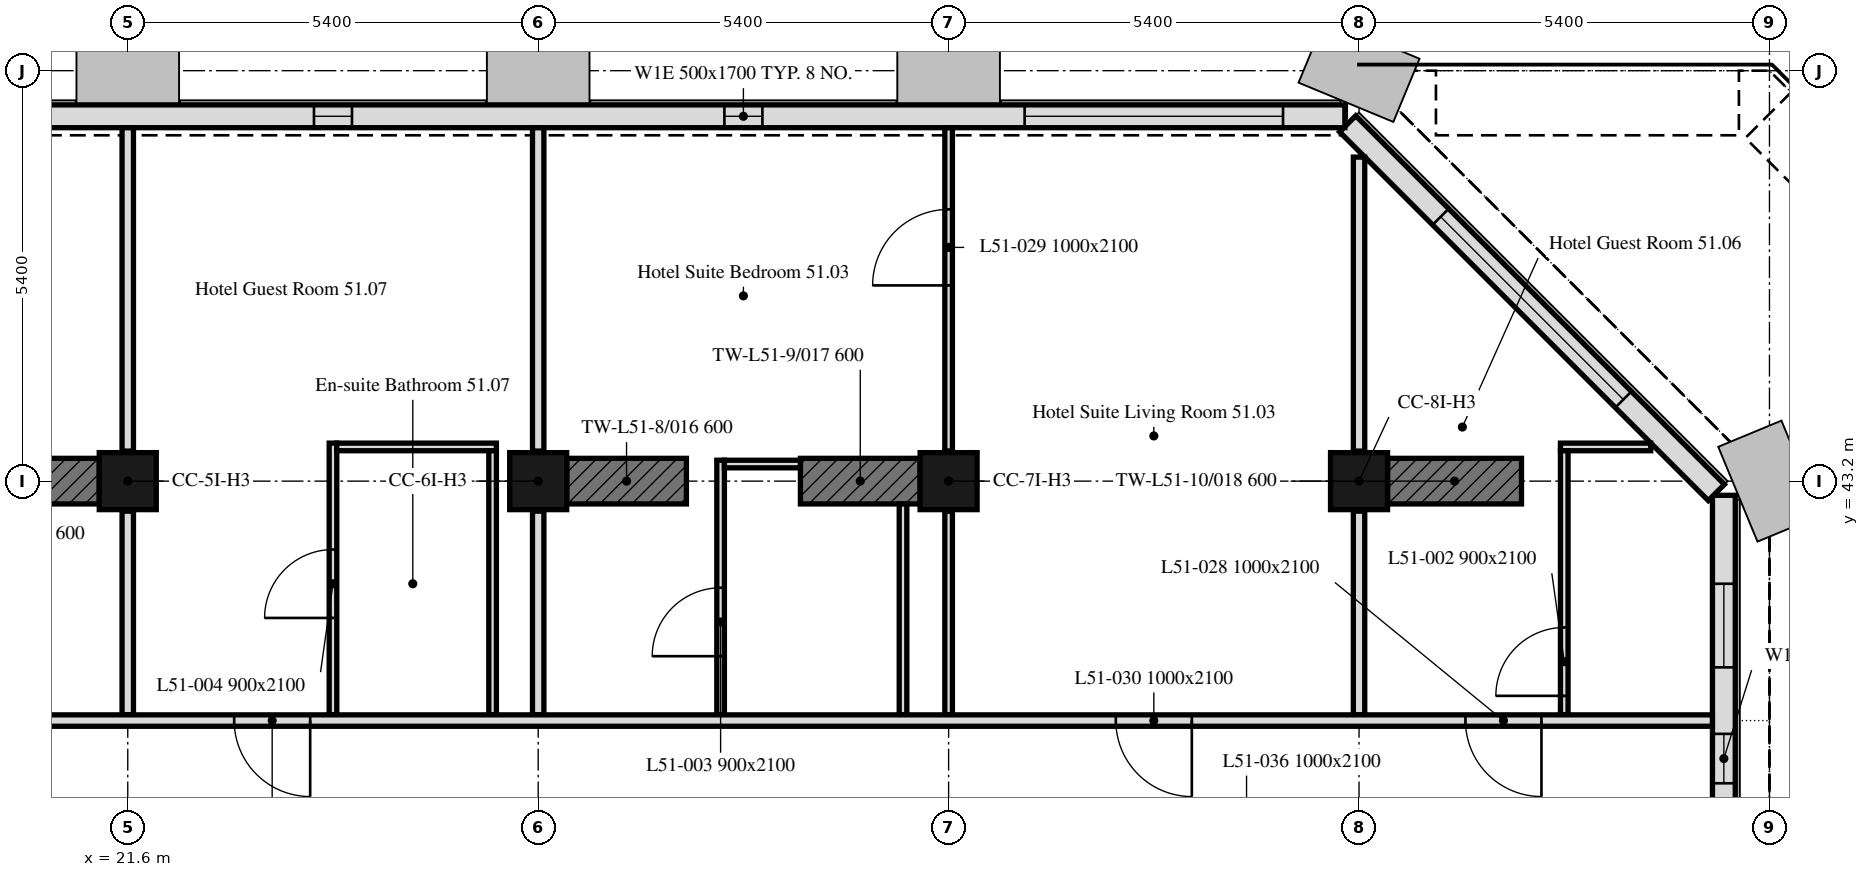
"""IFC4 building model, lengths in metres.
Left out: names, types, materials, properties, quantities, classifications, styles, units other than length and angle.
Written with IfcOpenShell. Run it as: python <this file> out.ifc"""

import sys

from ifc_helpers import new_model, si_unit, direction, frame, frame_2d, origin, origin_2d, place, context, subcontext, project, spatial, rectangle, extrude, element, fill, save


model = new_model("IFC4")
c1 = context("Model", 3, precision=1e-05, world=origin(), true_north=direction((0.0, 1.0)))
c2 = subcontext(c1, "Body", "Model", "MODEL_VIEW")
j1 = project(units=[si_unit("LENGTHUNIT", "METRE"), si_unit("PLANEANGLEUNIT", "RADIAN")], contexts=[c1])
p1 = place(None, origin())
s1 = spatial("IfcSite", under=j1, at=p1, CompositionType="ELEMENT")
p2 = place(p1, origin())
s2 = spatial("IfcBuilding", under=s1, at=p2, CompositionType="ELEMENT")
p3 = place(p2, frame((0.0, 0.0, 207.1)))
s3 = spatial("IfcBuildingStorey", under=s2, at=p3, CompositionType="ELEMENT", Elevation=207.1)
for number, where, z_axis, x_axis in (
    (1, (21.6, 43.2, 0.0), (0.0, 0.0, 1.0), (1.0, 0.0, 0.0)),
    (2, (27.0, 43.2, 0.0), (0.0, 0.0, 1.0), (1.0, 0.0, 0.0)),
    (3, (32.4, 43.2, 0.0), (0.0, 0.0, 1.0), (1.0, 0.0, 0.0)),
    (4, (37.8, 43.2, 0.0), (0.0, 0.0, 1.0), (1.0, 0.0, 0.0)),
):
    element("IfcColumn", number, at=place(p3, frame(where, z_axis=z_axis, x_axis=x_axis)), inside=s3, PredefinedType="COLUMN", context=c2, shape_type="SweptSolid", body=[
        extrude(rectangle(XDim=0.75, YDim=0.75, at=origin_2d()), origin(), (0.0, 0.0, 1.0), 3.0),
    ])
p4 = place(p3, frame((19.65, 43.2, 0.0), z_axis=(0.0, 0.0, 1.0), x_axis=(1.0, 0.0, 0.0)))
e5 = element("IfcWall", 5, at=p4, inside=s3, PredefinedType="SHEAR", context=c2, shape_type="SweptSolid", body=[
    extrude(rectangle(XDim=1.575, YDim=0.6, at=frame_2d((0.788, 0.0))), origin(), (0.0, 0.0, 1.0), 3.0),
])
for number, where, z_axis, x_axis in (
    (6, (27.375, 43.2, 0.0), (0.0, 0.0, 1.0), (1.0, 0.0, 0.0)),
    (7, (30.45, 43.2, 0.0), (0.0, 0.0, 1.0), (1.0, 0.0, 0.0)),
):
    element("IfcWall", number, at=place(p3, frame(where, z_axis=z_axis, x_axis=x_axis)), inside=s3, PredefinedType="SHEAR", context=c2, shape_type="SweptSolid", body=[
        extrude(rectangle(XDim=1.575, YDim=0.6, at=frame_2d((0.788, 0.0))), origin(), (0.0, 0.0, 1.0), 3.0),
    ])
p5 = place(p3, frame((38.175, 43.2, 0.0), z_axis=(0.0, 0.0, 1.0), x_axis=(1.0, 0.0, 0.0)))
e8 = element("IfcWall", 8, at=p5, inside=s3, PredefinedType="SHEAR", context=c2, shape_type="SweptSolid", body=[
    extrude(rectangle(XDim=1.762, YDim=0.6, at=frame_2d((0.881, 0.0))), origin(), (0.0, 0.0, 1.0), 3.0),
])
p6 = place(p3, frame((42.6, 32.4, 0.0), z_axis=(0.0, 0.0, 1.0), x_axis=(0.0, 1.0, 0.0)))
e9 = element("IfcWall", 9, at=p6, inside=s3, PredefinedType="SOLIDWALL", context=c2, shape_type="SweptSolid", body=[
    extrude(rectangle(XDim=10.614, YDim=0.3, at=frame_2d((5.307, 0.0))), origin(), (0.0, 0.0, 1.0), 3.0),
])
p7 = place(p6, frame((1.0, 0.0, 0.9)))
e10 = element("IfcOpeningElement", 10, at=p7, cuts=e9, PredefinedType="OPENING", context=c2, shape_type="SweptSolid", body=[
    extrude(rectangle(XDim=3.4, YDim=1.7, at=frame_2d((1.7, 0.85))), frame((0.0, 0.16, 0.0), z_axis=(0.0, -1.0, 0.0), x_axis=(1.0, 0.0, 0.0)), (0.0, 0.0, 1.0), 0.32),
])
p8 = place(p6, frame((6.825, 0.0, 0.9)))
e11 = element("IfcOpeningElement", 11, at=p8, cuts=e9, PredefinedType="OPENING", context=c2, shape_type="SweptSolid", body=[
    extrude(rectangle(XDim=0.65, YDim=1.7, at=frame_2d((0.325, 0.85))), frame((0.0, 0.16, 0.0), z_axis=(0.0, -1.0, 0.0), x_axis=(1.0, 0.0, 0.0)), (0.0, 0.0, 1.0), 0.32),
])
p9 = place(p6, frame((8.35, 0.0, 0.9)))
e12 = element("IfcOpeningElement", 12, at=p9, cuts=e9, PredefinedType="OPENING", context=c2, shape_type="SweptSolid", body=[
    extrude(rectangle(XDim=1.1, YDim=1.7, at=frame_2d((0.55, 0.85))), frame((0.0, 0.16, 0.0), z_axis=(0.0, -1.0, 0.0), x_axis=(1.0, 0.0, 0.0)), (0.0, 0.0, 1.0), 0.32),
])
p10 = place(p3, frame((42.501, 43.051, 0.0), z_axis=(0.0, 0.0, 1.0), x_axis=(-0.707106781187, 0.707106781187, 0.0)))
e13 = element("IfcWall", 13, at=p10, inside=s3, PredefinedType="SOLIDWALL", context=c2, shape_type="SweptSolid", body=[
    extrude(rectangle(XDim=6.86, YDim=0.3, at=frame_2d((3.43, 0.0))), origin(), (0.0, 0.0, 1.0), 3.0),
])
p11 = place(p10, frame((1.73, 0.0, 0.9)))
e14 = element("IfcOpeningElement", 14, at=p11, cuts=e13, PredefinedType="OPENING", context=c2, shape_type="SweptSolid", body=[
    extrude(rectangle(XDim=3.4, YDim=1.7, at=frame_2d((1.7, 0.85))), frame((0.0, 0.16, 0.0), z_axis=(0.0, -1.0, 0.0), x_axis=(1.0, 0.0, 0.0)), (0.0, 0.0, 1.0), 0.32),
])
p12 = place(p3, frame((37.614, 48.0, 0.0), z_axis=(0.0, 0.0, 1.0), x_axis=(-1.0, 0.0, 0.0)))
e15 = element("IfcWall", 15, at=p12, inside=s3, PredefinedType="SOLIDWALL", context=c2, shape_type="SweptSolid", body=[
    extrude(rectangle(XDim=32.027, YDim=0.3, at=frame_2d((16.014, 0.0))), origin(), (0.0, 0.0, 1.0), 3.0),
])
p13 = place(p12, frame((0.814, 0.0, 0.9)))
e16 = element("IfcOpeningElement", 16, at=p13, cuts=e15, PredefinedType="OPENING", context=c2, shape_type="SweptSolid", body=[
    extrude(rectangle(XDim=3.4, YDim=1.7, at=frame_2d((1.7, 0.85))), frame((0.0, 0.16, 0.0), z_axis=(0.0, -1.0, 0.0), x_axis=(1.0, 0.0, 0.0)), (0.0, 0.0, 1.0), 0.32),
])
p14 = place(p12, frame((7.664, 0.0, 0.9)))
e17 = element("IfcOpeningElement", 17, at=p14, cuts=e15, PredefinedType="OPENING", context=c2, shape_type="SweptSolid", body=[
    extrude(rectangle(XDim=0.5, YDim=1.7, at=frame_2d((0.25, 0.85))), frame((0.0, 0.16, 0.0), z_axis=(0.0, -1.0, 0.0), x_axis=(1.0, 0.0, 0.0)), (0.0, 0.0, 1.0), 0.32),
])
p15 = place(p12, frame((13.064, 0.0, 0.9)))
e18 = element("IfcOpeningElement", 18, at=p15, cuts=e15, PredefinedType="OPENING", context=c2, shape_type="SweptSolid", body=[
    extrude(rectangle(XDim=0.5, YDim=1.7, at=frame_2d((0.25, 0.85))), frame((0.0, 0.16, 0.0), z_axis=(0.0, -1.0, 0.0), x_axis=(1.0, 0.0, 0.0)), (0.0, 0.0, 1.0), 0.32),
])
p16 = place(p12, frame((18.464, 0.0, 0.9)))
e19 = element("IfcOpeningElement", 19, at=p16, cuts=e15, PredefinedType="OPENING", context=c2, shape_type="SweptSolid", body=[
    extrude(rectangle(XDim=0.5, YDim=1.7, at=frame_2d((0.25, 0.85))), frame((0.0, 0.16, 0.0), z_axis=(0.0, -1.0, 0.0), x_axis=(1.0, 0.0, 0.0)), (0.0, 0.0, 1.0), 0.32),
])
p17 = place(p12, frame((23.864, 0.0, 0.9)))
e20 = element("IfcOpeningElement", 20, at=p17, cuts=e15, PredefinedType="OPENING", context=c2, shape_type="SweptSolid", body=[
    extrude(rectangle(XDim=0.5, YDim=1.7, at=frame_2d((0.25, 0.85))), frame((0.0, 0.16, 0.0), z_axis=(0.0, -1.0, 0.0), x_axis=(1.0, 0.0, 0.0)), (0.0, 0.0, 1.0), 0.32),
])
p18 = place(p12, frame((28.164, 0.0, 0.9)))
e21 = element("IfcOpeningElement", 21, at=p18, cuts=e15, PredefinedType="OPENING", context=c2, shape_type="SweptSolid", body=[
    extrude(rectangle(XDim=1.1, YDim=1.7, at=frame_2d((0.55, 0.85))), frame((0.0, 0.16, 0.0), z_axis=(0.0, -1.0, 0.0), x_axis=(1.0, 0.0, 0.0)), (0.0, 0.0, 1.0), 0.32),
])
p19 = place(p3, frame((40.45, 43.65, 0.0), z_axis=(0.0, 0.0, 1.0), x_axis=(1.0, 0.0, 0.0)))
e22 = element("IfcWall", 22, at=p19, inside=s3, PredefinedType="PARTITIONING", context=c2, shape_type="SweptSolid", body=[
    extrude(rectangle(XDim=1.188, YDim=0.1, at=frame_2d((0.594, 0.0))), origin(), (0.0, 0.0, 1.0), 3.0),
])
p20 = place(p3, frame((37.8, 47.463, 0.0), z_axis=(0.0, 0.0, 1.0), x_axis=(0.0, -1.0, 0.0)))
e23 = element("IfcWall", 23, at=p20, inside=s3, PredefinedType="PARTITIONING", context=c2, shape_type="SweptSolid", body=[
    extrude(rectangle(XDim=3.868, YDim=0.15, at=frame_2d((1.934, 0.0))), origin(), (0.0, 0.0, 1.0), 3.0),
])
p21 = place(p3, frame((37.8, 42.805, 0.0), z_axis=(0.0, 0.0, 1.0), x_axis=(0.0, -1.0, 0.0)))
e24 = element("IfcWall", 24, at=p21, inside=s3, PredefinedType="PARTITIONING", context=c2, shape_type="SweptSolid", body=[
    extrude(rectangle(XDim=2.68, YDim=0.15, at=frame_2d((1.34, 0.0))), origin(), (0.0, 0.0, 1.0), 3.0),
])
p22 = place(p3, frame((40.5, 40.125, 0.0), z_axis=(0.0, 0.0, 1.0), x_axis=(0.0, 1.0, 0.0)))
e25 = element("IfcWall", 25, at=p22, inside=s3, PredefinedType="PARTITIONING", context=c2, shape_type="SweptSolid", body=[
    extrude(rectangle(XDim=3.475, YDim=0.1, at=frame_2d((1.738, 0.0))), origin(), (0.0, 0.0, 1.0), 3.0),
])
p23 = place(p22, frame((0.25, 0.0, 0.0)))
e26 = element("IfcOpeningElement", 26, at=p23, cuts=e25, PredefinedType="OPENING", context=c2, shape_type="SweptSolid", body=[
    extrude(rectangle(XDim=0.9, YDim=2.1, at=frame_2d((0.45, 1.05))), frame((0.0, 0.05, 0.0), z_axis=(0.0, -1.0, 0.0), x_axis=(1.0, 0.0, 0.0)), (0.0, 0.0, 1.0), 0.1),
])
p24 = place(p3, frame((32.4, 40.125, 0.0), z_axis=(0.0, 0.0, 1.0), x_axis=(0.0, 1.0, 0.0)))
e27 = element("IfcWall", 27, at=p24, inside=s3, PredefinedType="PARTITIONING", context=c2, shape_type="SweptSolid", body=[
    extrude(rectangle(XDim=2.68, YDim=0.1, at=frame_2d((1.34, 0.0))), origin(), (0.0, 0.0, 1.0), 2.4),
])
p25 = place(p3, frame((32.4, 43.595, 0.0), z_axis=(0.0, 0.0, 1.0), x_axis=(0.0, 1.0, 0.0)))
e28 = element("IfcWall", 28, at=p25, inside=s3, PredefinedType="PARTITIONING", context=c2, shape_type="SweptSolid", body=[
    extrude(rectangle(XDim=4.254, YDim=0.1, at=frame_2d((2.127, 0.0))), origin(), (0.0, 0.0, 1.0), 2.4),
])
p26 = place(p25, frame((2.18, 0.0, 0.0)))
e29 = element("IfcOpeningElement", 29, at=p26, cuts=e28, PredefinedType="OPENING", context=c2, shape_type="SweptSolid", body=[
    extrude(rectangle(XDim=1.0, YDim=2.1, at=frame_2d((0.5, 1.05))), frame((0.0, 0.05, 0.0), z_axis=(0.0, -1.0, 0.0), x_axis=(1.0, 0.0, 0.0)), (0.0, 0.0, 1.0), 0.1),
])
p27 = place(p3, frame((27.0, 47.849, 0.0), z_axis=(0.0, 0.0, 1.0), x_axis=(0.0, -1.0, 0.0)))
e30 = element("IfcWall", 30, at=p27, inside=s3, PredefinedType="PARTITIONING", context=c2, shape_type="SweptSolid", body=[
    extrude(rectangle(XDim=4.254, YDim=0.15, at=frame_2d((2.127, 0.0))), origin(), (0.0, 0.0, 1.0), 2.4),
])
p28 = place(p3, frame((27.0, 42.805, 0.0), z_axis=(0.0, 0.0, 1.0), x_axis=(0.0, -1.0, 0.0)))
e31 = element("IfcWall", 31, at=p28, inside=s3, PredefinedType="PARTITIONING", context=c2, shape_type="SweptSolid", body=[
    extrude(rectangle(XDim=2.68, YDim=0.15, at=frame_2d((1.34, 0.0))), origin(), (0.0, 0.0, 1.0), 2.4),
])
p29 = place(p3, frame((29.4, 40.125, 0.0), z_axis=(0.0, 0.0, 1.0), x_axis=(0.0, 1.0, 0.0)))
e32 = element("IfcWall", 32, at=p29, inside=s3, PredefinedType="PARTITIONING", context=c2, shape_type="SweptSolid", body=[
    extrude(rectangle(XDim=3.35, YDim=0.1, at=frame_2d((1.675, 0.0))), origin(), (0.0, 0.0, 1.0), 3.0),
])
p30 = place(p29, frame((0.772, 0.0, 0.0)))
e33 = element("IfcOpeningElement", 33, at=p30, cuts=e32, PredefinedType="OPENING", context=c2, shape_type="SweptSolid", body=[
    extrude(rectangle(XDim=0.9, YDim=2.1, at=frame_2d((0.45, 1.05))), frame((0.0, 0.05, 0.0), z_axis=(0.0, -1.0, 0.0), x_axis=(1.0, 0.0, 0.0)), (0.0, 0.0, 1.0), 0.1),
])
p31 = place(p3, frame((29.45, 43.425, 0.0), z_axis=(0.0, 0.0, 1.0), x_axis=(1.0, 0.0, 0.0)))
e34 = element("IfcWall", 34, at=p31, inside=s3, PredefinedType="PARTITIONING", context=c2, shape_type="SweptSolid", body=[
    extrude(rectangle(XDim=1.0, YDim=0.1, at=frame_2d((0.5, 0.0))), origin(), (0.0, 0.0, 1.0), 3.0),
])
p32 = place(p3, frame((31.8, 42.899, 0.0), z_axis=(0.0, 0.0, 1.0), x_axis=(0.0, -1.0, 0.0)))
e35 = element("IfcWall", 35, at=p32, inside=s3, PredefinedType="PARTITIONING", context=c2, shape_type="SweptSolid", body=[
    extrude(rectangle(XDim=2.774, YDim=0.1, at=frame_2d((1.387, 0.0))), origin(), (0.0, 0.0, 1.0), 3.0),
])
p33 = place(p3, frame((21.6, 47.849, 0.0), z_axis=(0.0, 0.0, 1.0), x_axis=(0.0, -1.0, 0.0)))
e36 = element("IfcWall", 36, at=p33, inside=s3, PredefinedType="PARTITIONING", context=c2, shape_type="SweptSolid", body=[
    extrude(rectangle(XDim=4.254, YDim=0.15, at=frame_2d((2.127, 0.0))), origin(), (0.0, 0.0, 1.0), 2.4),
])
p34 = place(p3, frame((21.6, 42.805, 0.0), z_axis=(0.0, 0.0, 1.0), x_axis=(0.0, -1.0, 0.0)))
e37 = element("IfcWall", 37, at=p34, inside=s3, PredefinedType="PARTITIONING", context=c2, shape_type="SweptSolid", body=[
    extrude(rectangle(XDim=2.68, YDim=0.15, at=frame_2d((1.34, 0.0))), origin(), (0.0, 0.0, 1.0), 2.4),
])
p35 = place(p3, frame((24.3, 40.125, 0.0), z_axis=(0.0, 0.0, 1.0), x_axis=(0.0, 1.0, 0.0)))
e38 = element("IfcWall", 38, at=p35, inside=s3, PredefinedType="PARTITIONING", context=c2, shape_type="SweptSolid", body=[
    extrude(rectangle(XDim=3.575, YDim=0.1, at=frame_2d((1.788, 0.0))), origin(), (0.0, 0.0, 1.0), 3.0),
])
p36 = place(p35, frame((1.275, 0.0, 0.0)))
e39 = element("IfcOpeningElement", 39, at=p36, cuts=e38, PredefinedType="OPENING", context=c2, shape_type="SweptSolid", body=[
    extrude(rectangle(XDim=0.9, YDim=2.1, at=frame_2d((0.45, 1.05))), frame((0.0, 0.05, 0.0), z_axis=(0.0, -1.0, 0.0), x_axis=(1.0, 0.0, 0.0)), (0.0, 0.0, 1.0), 0.1),
])
p37 = place(p3, frame((24.35, 43.65, 0.0), z_axis=(0.0, 0.0, 1.0), x_axis=(1.0, 0.0, 0.0)))
e40 = element("IfcWall", 40, at=p37, inside=s3, PredefinedType="PARTITIONING", context=c2, shape_type="SweptSolid", body=[
    extrude(rectangle(XDim=2.1, YDim=0.1, at=frame_2d((1.05, 0.0))), origin(), (0.0, 0.0, 1.0), 3.0),
])
p38 = place(p3, frame((26.4, 43.6, 0.0), z_axis=(0.0, 0.0, 1.0), x_axis=(0.0, -1.0, 0.0)))
e41 = element("IfcWall", 41, at=p38, inside=s3, PredefinedType="PARTITIONING", context=c2, shape_type="SweptSolid", body=[
    extrude(rectangle(XDim=3.475, YDim=0.1, at=frame_2d((1.738, 0.0))), origin(), (0.0, 0.0, 1.0), 3.0),
])
p39 = place(p3, frame((42.449, 40.05, 0.0), z_axis=(0.0, 0.0, 1.0), x_axis=(-1.0, 0.0, 0.0)))
e42 = element("IfcWall", 42, at=p39, inside=s3, PredefinedType="PARTITIONING", context=c2, shape_type="SweptSolid", body=[
    extrude(rectangle(XDim=41.698, YDim=0.15, at=frame_2d((20.849, 0.0))), origin(), (0.0, 0.0, 1.0), 2.4),
])
p40 = place(p39, frame((2.249, 0.0, 0.0)))
e43 = element("IfcOpeningElement", 43, at=p40, cuts=e42, PredefinedType="OPENING", context=c2, shape_type="SweptSolid", body=[
    extrude(rectangle(XDim=1.0, YDim=2.1, at=frame_2d((0.5, 1.05))), frame((0.0, 0.075, 0.0), z_axis=(0.0, -1.0, 0.0), x_axis=(1.0, 0.0, 0.0)), (0.0, 0.0, 1.0), 0.15),
])
p41 = place(p39, frame((6.849, 0.0, 0.0)))
e44 = element("IfcOpeningElement", 44, at=p41, cuts=e42, PredefinedType="OPENING", context=c2, shape_type="SweptSolid", body=[
    extrude(rectangle(XDim=1.0, YDim=2.1, at=frame_2d((0.5, 1.05))), frame((0.0, 0.075, 0.0), z_axis=(0.0, -1.0, 0.0), x_axis=(1.0, 0.0, 0.0)), (0.0, 0.0, 1.0), 0.15),
])
p42 = place(p39, frame((18.449, 0.0, 0.0)))
e45 = element("IfcOpeningElement", 45, at=p42, cuts=e42, PredefinedType="OPENING", context=c2, shape_type="SweptSolid", body=[
    extrude(rectangle(XDim=1.0, YDim=2.1, at=frame_2d((0.5, 1.05))), frame((0.0, 0.075, 0.0), z_axis=(0.0, -1.0, 0.0), x_axis=(1.0, 0.0, 0.0)), (0.0, 0.0, 1.0), 0.15),
])
p43 = place(p39, frame((23.049, 0.0, 0.0)))
e46 = element("IfcOpeningElement", 46, at=p43, cuts=e42, PredefinedType="OPENING", context=c2, shape_type="SweptSolid", body=[
    extrude(rectangle(XDim=1.0, YDim=2.1, at=frame_2d((0.5, 1.05))), frame((0.0, 0.075, 0.0), z_axis=(0.0, -1.0, 0.0), x_axis=(1.0, 0.0, 0.0)), (0.0, 0.0, 1.0), 0.15),
])
p44 = place(p39, frame((37.954, 0.0, 0.0)))
e47 = element("IfcOpeningElement", 47, at=p44, cuts=e42, PredefinedType="OPENING", context=c2, shape_type="SweptSolid", body=[
    extrude(rectangle(XDim=1.0, YDim=2.1, at=frame_2d((0.5, 1.05))), frame((0.0, 0.075, 0.0), z_axis=(0.0, -1.0, 0.0), x_axis=(1.0, 0.0, 0.0)), (0.0, 0.0, 1.0), 0.15),
])
p45 = place(p8, origin())
e48 = element("IfcWindow", 48, at=p45, inside=s3, PartitioningType="SINGLE_PANEL", PredefinedType="WINDOW", context=c2, shape_type="SweptSolid", body=[
    extrude(rectangle(XDim=0.65, YDim=1.7, at=frame_2d((0.325, 0.85))), frame((0.0, 0.03, 0.0), z_axis=(0.0, -1.0, 0.0), x_axis=(1.0, 0.0, 0.0)), (0.0, 0.0, 1.0), 0.06),
])
fill(e11, e48)
p46 = place(p9, origin())
e49 = element("IfcWindow", 49, at=p46, inside=s3, PartitioningType="SINGLE_PANEL", PredefinedType="WINDOW", context=c2, shape_type="SweptSolid", body=[
    extrude(rectangle(XDim=1.1, YDim=1.7, at=frame_2d((0.55, 0.85))), frame((0.0, 0.03, 0.0), z_axis=(0.0, -1.0, 0.0), x_axis=(1.0, 0.0, 0.0)), (0.0, 0.0, 1.0), 0.06),
])
fill(e12, e49)
p47 = place(p11, origin())
e50 = element("IfcWindow", 50, at=p47, inside=s3, PartitioningType="SINGLE_PANEL", PredefinedType="WINDOW", context=c2, shape_type="SweptSolid", body=[
    extrude(rectangle(XDim=3.4, YDim=1.7, at=frame_2d((1.7, 0.85))), frame((0.0, 0.03, 0.0), z_axis=(0.0, -1.0, 0.0), x_axis=(1.0, 0.0, 0.0)), (0.0, 0.0, 1.0), 0.06),
])
fill(e14, e50)
p48 = place(p13, origin())
e51 = element("IfcWindow", 51, at=p48, inside=s3, PartitioningType="SINGLE_PANEL", PredefinedType="WINDOW", context=c2, shape_type="SweptSolid", body=[
    extrude(rectangle(XDim=3.4, YDim=1.7, at=frame_2d((1.7, 0.85))), frame((0.0, 0.03, 0.0), z_axis=(0.0, -1.0, 0.0), x_axis=(1.0, 0.0, 0.0)), (0.0, 0.0, 1.0), 0.06),
])
fill(e16, e51)
p49 = place(p14, origin())
e52 = element("IfcWindow", 52, at=p49, inside=s3, PartitioningType="SINGLE_PANEL", PredefinedType="WINDOW", context=c2, shape_type="SweptSolid", body=[
    extrude(rectangle(XDim=0.5, YDim=1.7, at=frame_2d((0.25, 0.85))), frame((0.0, 0.03, 0.0), z_axis=(0.0, -1.0, 0.0), x_axis=(1.0, 0.0, 0.0)), (0.0, 0.0, 1.0), 0.06),
])
fill(e17, e52)
p50 = place(p15, origin())
e53 = element("IfcWindow", 53, at=p50, inside=s3, PartitioningType="SINGLE_PANEL", PredefinedType="WINDOW", context=c2, shape_type="SweptSolid", body=[
    extrude(rectangle(XDim=0.5, YDim=1.7, at=frame_2d((0.25, 0.85))), frame((0.0, 0.03, 0.0), z_axis=(0.0, -1.0, 0.0), x_axis=(1.0, 0.0, 0.0)), (0.0, 0.0, 1.0), 0.06),
])
fill(e18, e53)
p51 = place(p23, origin())
e54 = element("IfcDoor", 54, at=p51, inside=s3, OperationType="SINGLE_SWING_RIGHT", PredefinedType="DOOR", context=c2, shape_type="SweptSolid", body=[
    extrude(rectangle(XDim=0.9, YDim=2.1, at=frame_2d((0.45, 1.05))), frame((0.0, 0.025, 0.0), z_axis=(0.0, -1.0, 0.0), x_axis=(1.0, 0.0, 0.0)), (0.0, 0.0, 1.0), 0.05),
])
fill(e26, e54)
p52 = place(p30, origin())
e55 = element("IfcDoor", 55, at=p52, inside=s3, OperationType="SINGLE_SWING_RIGHT", PredefinedType="DOOR", context=c2, shape_type="SweptSolid", body=[
    extrude(rectangle(XDim=0.9, YDim=2.1, at=frame_2d((0.45, 1.05))), frame((0.0, 0.025, 0.0), z_axis=(0.0, -1.0, 0.0), x_axis=(1.0, 0.0, 0.0)), (0.0, 0.0, 1.0), 0.05),
])
fill(e33, e55)
p53 = place(p36, origin())
e56 = element("IfcDoor", 56, at=p53, inside=s3, OperationType="SINGLE_SWING_LEFT", PredefinedType="DOOR", context=c2, shape_type="SweptSolid", body=[
    extrude(rectangle(XDim=0.9, YDim=2.1, at=frame_2d((0.45, 1.05))), frame((0.0, 0.025, 0.0), z_axis=(0.0, -1.0, 0.0), x_axis=(1.0, 0.0, 0.0)), (0.0, 0.0, 1.0), 0.05),
])
fill(e39, e56)
p54 = place(p40, origin())
e57 = element("IfcDoor", 57, at=p54, inside=s3, OperationType="SINGLE_SWING_RIGHT", PredefinedType="DOOR", context=c2, shape_type="SweptSolid", body=[
    extrude(rectangle(XDim=1.0, YDim=2.1, at=frame_2d((0.5, 1.05))), frame((0.0, 0.025, 0.0), z_axis=(0.0, -1.0, 0.0), x_axis=(1.0, 0.0, 0.0)), (0.0, 0.0, 1.0), 0.05),
])
fill(e43, e57)
p55 = place(p26, origin())
e58 = element("IfcDoor", 58, at=p55, inside=s3, OperationType="SINGLE_SWING_RIGHT", PredefinedType="DOOR", context=c2, shape_type="SweptSolid", body=[
    extrude(rectangle(XDim=1.0, YDim=2.1, at=frame_2d((0.5, 1.05))), frame((0.0, 0.025, 0.0), z_axis=(0.0, -1.0, 0.0), x_axis=(1.0, 0.0, 0.0)), (0.0, 0.0, 1.0), 0.05),
])
fill(e29, e58)
p56 = place(p41, origin())
e59 = element("IfcDoor", 59, at=p56, inside=s3, OperationType="SINGLE_SWING_RIGHT", PredefinedType="DOOR", context=c2, shape_type="SweptSolid", body=[
    extrude(rectangle(XDim=1.0, YDim=2.1, at=frame_2d((0.5, 1.05))), frame((0.0, 0.025, 0.0), z_axis=(0.0, -1.0, 0.0), x_axis=(1.0, 0.0, 0.0)), (0.0, 0.0, 1.0), 0.05),
])
fill(e44, e59)
p57 = place(p42, origin())
e60 = element("IfcDoor", 60, at=p57, inside=s3, OperationType="SINGLE_SWING_LEFT", PredefinedType="DOOR", context=c2, shape_type="SweptSolid", body=[
    extrude(rectangle(XDim=1.0, YDim=2.1, at=frame_2d((0.5, 1.05))), frame((0.0, 0.025, 0.0), z_axis=(0.0, -1.0, 0.0), x_axis=(1.0, 0.0, 0.0)), (0.0, 0.0, 1.0), 0.05),
])
fill(e45, e60)
save(model, sys.argv[1])
